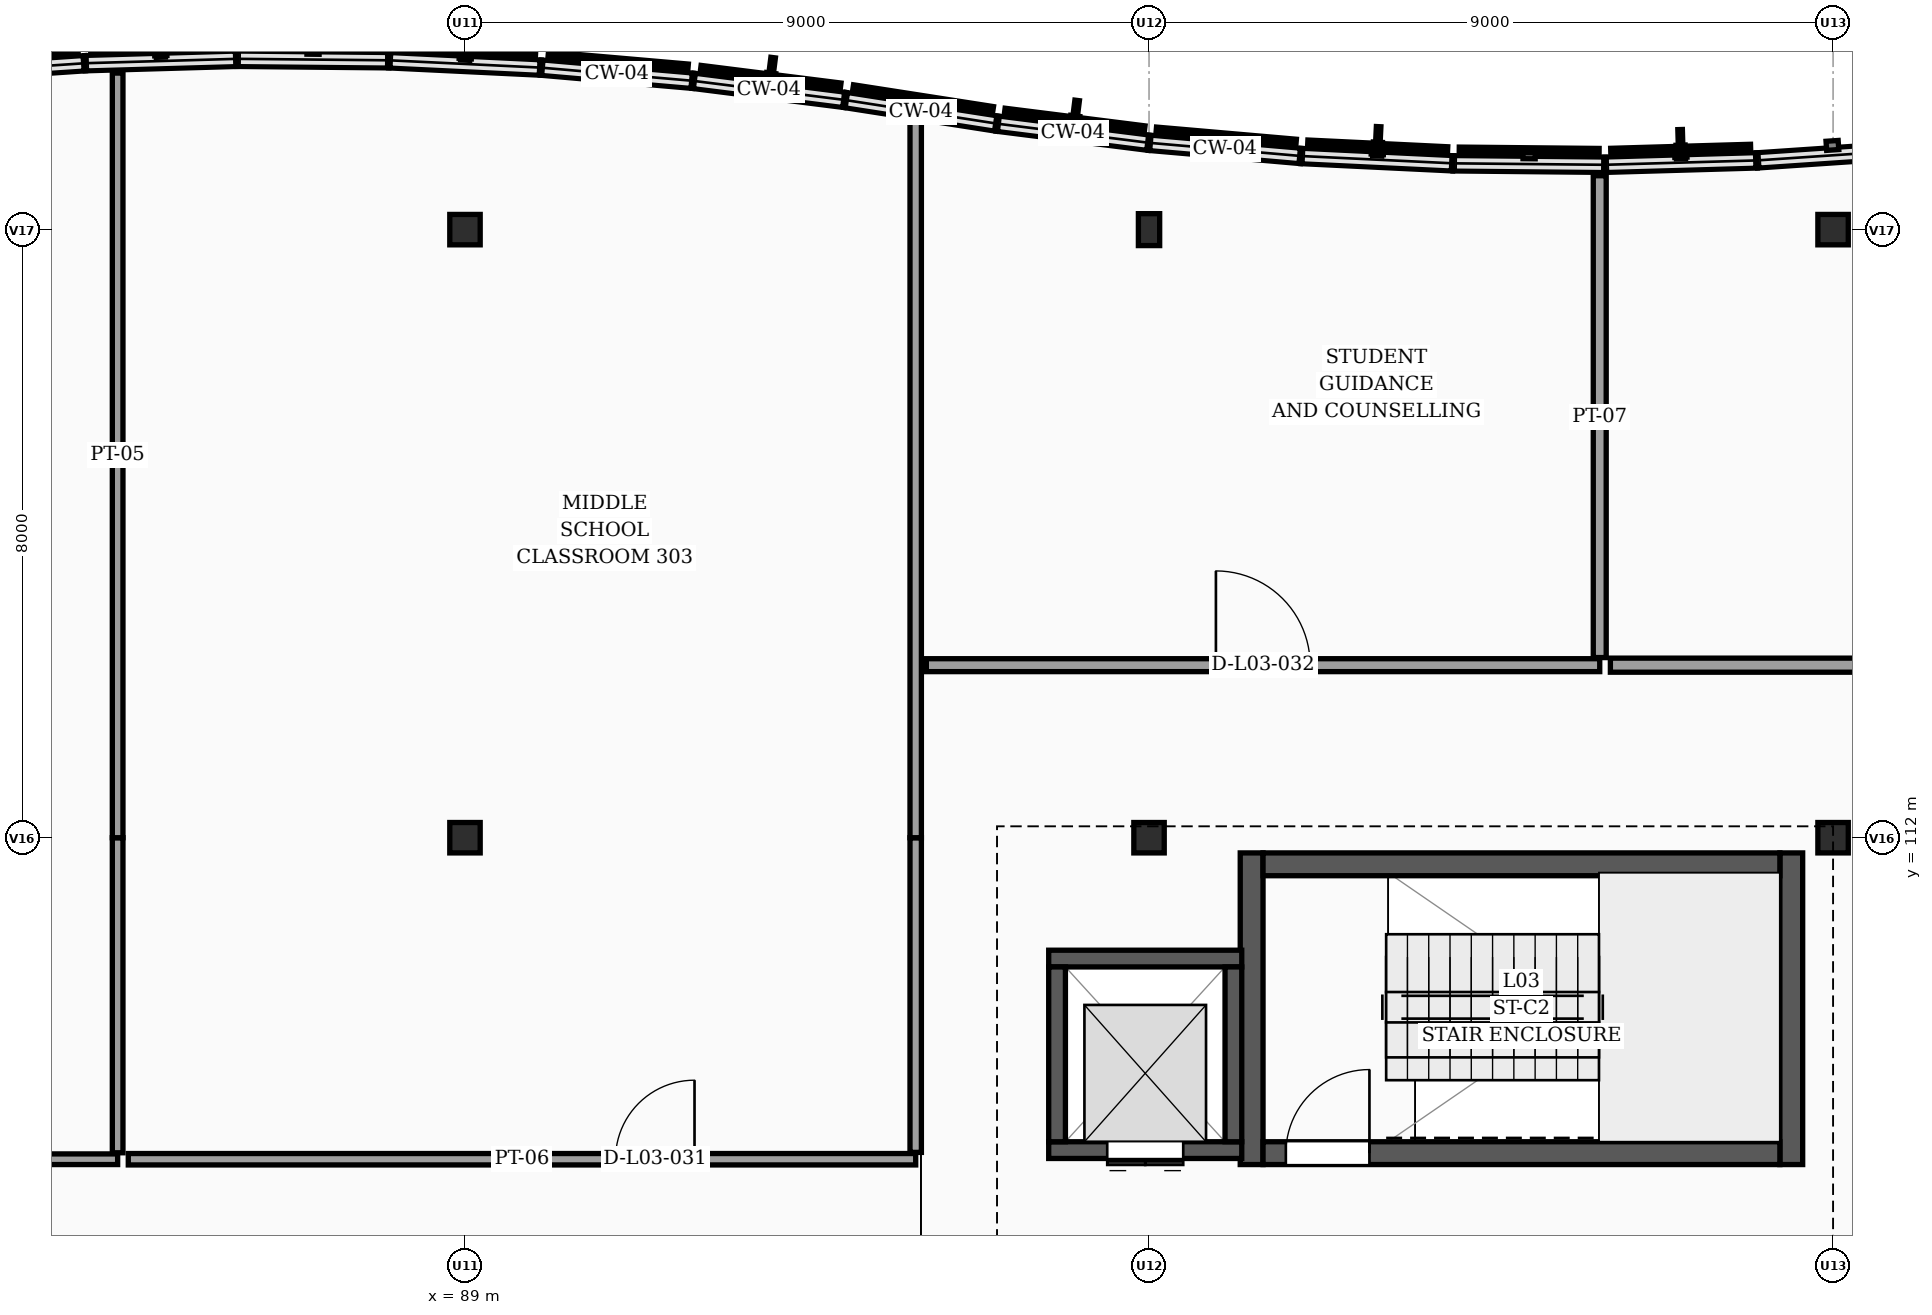
"""IFC4 building model, lengths in metres.
Left out: names, types, materials, properties, quantities, classifications, styles, units other than length and angle.
Written with IfcOpenShell. Run it as: python <this file> out.ifc"""

import sys

from ifc_helpers import new_model, si_unit, direction, frame, frame_2d, origin, origin_2d, place, context, subcontext, project, spatial, rectangle, extrude, element, fill, save


model = new_model("IFC4")
c1 = context("Model", 3, precision=1e-05, world=origin(), true_north=direction((0.0, 1.0)))
c2 = subcontext(c1, "Body", "Model", "MODEL_VIEW")
j1 = project(units=[si_unit("LENGTHUNIT", "METRE"), si_unit("PLANEANGLEUNIT", "RADIAN")], contexts=[c1])
p1 = place(None, origin())
s1 = spatial("IfcSite", under=j1, at=p1, CompositionType="ELEMENT")
p2 = place(p1, origin())
s2 = spatial("IfcBuilding", under=s1, at=p2, CompositionType="ELEMENT")
p3 = place(p2, frame((0.0, 0.0, 12.3)))
s3 = spatial("IfcBuildingStorey", under=s2, at=p3, CompositionType="ELEMENT", Elevation=12.3)
for number, where, z_axis, x_axis in (
    (1, (89.0, 112.0, 0.0), (0.0, 0.0, 1.0), (1.0, 0.0, 0.0)),
    (2, (89.0, 120.0, 0.0), (0.0, 0.0, 1.0), (1.0, 0.0, 0.0)),
    (3, (98.0, 112.0, 0.0), (0.0, 0.0, 1.0), (1.0, 0.0, 0.0)),
):
    element("IfcColumn", number, at=place(p3, frame(where, z_axis=z_axis, x_axis=x_axis)), inside=s3, PredefinedType="COLUMN", context=c2, shape_type="SweptSolid", body=[
        extrude(rectangle(XDim=0.4, YDim=0.4, at=origin_2d()), origin(), (0.0, 0.0, 1.0), 3.9),
    ])
p4 = place(p3, frame((98.0, 120.0, 0.0), z_axis=(0.0, 0.0, 1.0), x_axis=(1.0, 0.0, 0.0)))
e4 = element("IfcColumn", 4, at=p4, inside=s3, PredefinedType="PILASTER", context=c2, shape_type="SweptSolid", body=[
    extrude(rectangle(XDim=0.28, YDim=0.42, at=origin_2d()), origin(), (0.0, 0.0, 1.0), 3.9),
])
for number, where, z_axis, x_axis in (
    (5, (107.0, 112.0, 0.0), (0.0, 0.0, 1.0), (1.0, 0.0, 0.0)),
    (6, (107.0, 120.0, 0.0), (0.0, 0.0, 1.0), (1.0, 0.0, 0.0)),
):
    element("IfcColumn", number, at=place(p3, frame(where, z_axis=z_axis, x_axis=x_axis)), inside=s3, PredefinedType="COLUMN", context=c2, shape_type="SweptSolid", body=[
        extrude(rectangle(XDim=0.4, YDim=0.4, at=origin_2d()), origin(), (0.0, 0.0, 1.0), 3.9),
    ])
p5 = place(p3, frame((82.0, 122.054, 0.0), z_axis=(0.0, 0.0, 1.0), x_axis=(0.997729302978, 0.067351599676, 0.0)))
e7 = element("IfcWall", 7, at=p5, inside=s3, PredefinedType="SOLIDWALL", context=c2, shape_type="SweptSolid", body=[
    extrude(rectangle(XDim=2.005, YDim=0.2, at=frame_2d((1.002, 0.0))), origin(), (0.0, 0.0, 1.0), 0.95),
])
p6 = place(p3, frame((84.0, 122.189, 0.0), z_axis=(0.0, 0.0, 1.0), x_axis=(0.999581770858, 0.028918564416, 0.0)))
e8 = element("IfcWall", 8, at=p6, inside=s3, PredefinedType="SOLIDWALL", context=c2, shape_type="SweptSolid", body=[
    extrude(rectangle(XDim=2.001, YDim=0.2, at=frame_2d((1.0, 0.0))), origin(), (0.0, 0.0, 1.0), 0.95),
])
p7 = place(p3, frame((86.0, 122.247, 0.0), z_axis=(0.0, 0.0, 1.0), x_axis=(0.999953504169, -0.009643106302, 0.0)))
e9 = element("IfcWall", 9, at=p7, inside=s3, PredefinedType="SOLIDWALL", context=c2, shape_type="SweptSolid", body=[
    extrude(rectangle(XDim=2.0, YDim=0.2, at=frame_2d((1.0, 0.0))), origin(), (0.0, 0.0, 1.0), 0.95),
])
p8 = place(p3, frame((88.0, 122.228, 0.0), z_axis=(0.0, 0.0, 1.0), x_axis=(0.99884540439, -0.048040172037, 0.0)))
e10 = element("IfcWall", 10, at=p8, inside=s3, PredefinedType="SOLIDWALL", context=c2, shape_type="SweptSolid", body=[
    extrude(rectangle(XDim=2.002, YDim=0.2, at=frame_2d((1.001, 0.0))), origin(), (0.0, 0.0, 1.0), 0.95),
])
p9 = place(p3, frame((90.0, 122.132, 0.0), z_axis=(0.0, 0.0, 1.0), x_axis=(0.996244237948, -0.086587633962, 0.0)))
e11 = element("IfcWall", 11, at=p9, inside=s3, PredefinedType="SOLIDWALL", context=c2, shape_type="SweptSolid", body=[
    extrude(rectangle(XDim=2.008, YDim=0.2, at=frame_2d((1.004, 0.0))), origin(), (0.0, 0.0, 1.0), 0.95),
])
p10 = place(p3, frame((92.0, 121.958, 0.0), z_axis=(0.0, 0.0, 1.0), x_axis=(0.992158168336, -0.124988675503, 0.0)))
e12 = element("IfcWall", 12, at=p10, inside=s3, PredefinedType="SOLIDWALL", context=c2, shape_type="SweptSolid", body=[
    extrude(rectangle(XDim=2.016, YDim=0.2, at=frame_2d((1.008, 0.0))), origin(), (0.0, 0.0, 1.0), 0.95),
])
p11 = place(p3, frame((94.0, 121.706, 0.0), z_axis=(0.0, 0.0, 1.0), x_axis=(0.988085509852, -0.153905897287, 0.0)))
e13 = element("IfcWall", 13, at=p11, inside=s3, PredefinedType="SOLIDWALL", context=c2, shape_type="SweptSolid", body=[
    extrude(rectangle(XDim=2.024, YDim=0.2, at=frame_2d((1.012, 0.0))), origin(), (0.0, 0.0, 1.0), 0.95),
])
p12 = place(p3, frame((96.0, 121.394, 0.0), z_axis=(0.0, 0.0, 1.0), x_axis=(0.992158168336, -0.124988675503, 0.0)))
e14 = element("IfcWall", 14, at=p12, inside=s3, PredefinedType="SOLIDWALL", context=c2, shape_type="SweptSolid", body=[
    extrude(rectangle(XDim=2.016, YDim=0.2, at=frame_2d((1.008, 0.0))), origin(), (0.0, 0.0, 1.0), 0.95),
])
p13 = place(p3, frame((98.0, 121.142, 0.0), z_axis=(0.0, 0.0, 1.0), x_axis=(0.996244237948, -0.086587633962, 0.0)))
e15 = element("IfcWall", 15, at=p13, inside=s3, PredefinedType="SOLIDWALL", context=c2, shape_type="SweptSolid", body=[
    extrude(rectangle(XDim=2.008, YDim=0.2, at=frame_2d((1.004, 0.0))), origin(), (0.0, 0.0, 1.0), 0.95),
])
p14 = place(p3, frame((100.0, 120.969, 0.0), z_axis=(0.0, 0.0, 1.0), x_axis=(0.99884540439, -0.048040172037, 0.0)))
e16 = element("IfcWall", 16, at=p14, inside=s3, PredefinedType="SOLIDWALL", context=c2, shape_type="SweptSolid", body=[
    extrude(rectangle(XDim=2.002, YDim=0.2, at=frame_2d((1.001, 0.0))), origin(), (0.0, 0.0, 1.0), 0.95),
])
p15 = place(p3, frame((102.0, 120.872, 0.0), z_axis=(0.0, 0.0, 1.0), x_axis=(0.999953504169, -0.009643106302, 0.0)))
e17 = element("IfcWall", 17, at=p15, inside=s3, PredefinedType="SOLIDWALL", context=c2, shape_type="SweptSolid", body=[
    extrude(rectangle(XDim=2.0, YDim=0.2, at=frame_2d((1.0, 0.0))), origin(), (0.0, 0.0, 1.0), 0.95),
])
p16 = place(p3, frame((104.0, 120.853, 0.0), z_axis=(0.0, 0.0, 1.0), x_axis=(0.999585290582, 0.028796646555, 0.0)))
e18 = element("IfcWall", 18, at=p16, inside=s3, PredefinedType="SOLIDWALL", context=c2, shape_type="SweptSolid", body=[
    extrude(rectangle(XDim=2.001, YDim=0.2, at=frame_2d((1.0, 0.0))), origin(), (0.0, 0.0, 1.0), 0.95),
])
p17 = place(p3, frame((106.0, 120.911, 0.0), z_axis=(0.0, 0.0, 1.0), x_axis=(0.997729302978, 0.067351599676, 0.0)))
e19 = element("IfcWall", 19, at=p17, inside=s3, PredefinedType="SOLIDWALL", context=c2, shape_type="SweptSolid", body=[
    extrude(rectangle(XDim=2.005, YDim=0.2, at=frame_2d((1.002, 0.0))), origin(), (0.0, 0.0, 1.0), 0.95),
])
for number, where, z_axis, x_axis in (
    (20, (99.35, 107.7, 0.0), (0.0, 0.0, 1.0), (0.0, 1.0, 0.0)),
    (21, (106.45, 111.8, 0.0), (0.0, 0.0, 1.0), (0.0, -1.0, 0.0)),
):
    element("IfcWall", number, at=place(p3, frame(where, z_axis=z_axis, x_axis=x_axis)), inside=s3, PredefinedType="SHEAR", context=c2, shape_type="SweptSolid", body=[
        extrude(rectangle(XDim=4.1, YDim=0.3, at=frame_2d((2.05, 0.0))), origin(), (0.0, 0.0, 1.0), 3.65),
    ])
p18 = place(p3, frame((99.5, 107.85, 0.0), z_axis=(0.0, 0.0, 1.0), x_axis=(1.0, 0.0, 0.0)))
e22 = element("IfcWall", 22, at=p18, inside=s3, PredefinedType="SHEAR", context=c2, shape_type="SweptSolid", body=[
    extrude(rectangle(XDim=6.8, YDim=0.3, at=frame_2d((3.4, 0.0))), origin(), (0.0, 0.0, 1.0), 3.65),
])
p19 = place(p18, frame((0.3, 0.0, 0.0)))
e23 = element("IfcOpeningElement", 23, at=p19, cuts=e22, PredefinedType="OPENING", context=c2, shape_type="SweptSolid", body=[
    extrude(rectangle(XDim=1.1, YDim=2.15, at=frame_2d((0.55, 1.075))), frame((0.0, 0.16, 0.0), z_axis=(0.0, -1.0, 0.0), x_axis=(1.0, 0.0, 0.0)), (0.0, 0.0, 1.0), 0.32),
])
p20 = place(p3, frame((106.3, 111.65, 0.0), z_axis=(0.0, 0.0, 1.0), x_axis=(-1.0, 0.0, 0.0)))
e24 = element("IfcWall", 24, at=p20, inside=s3, PredefinedType="SHEAR", context=c2, shape_type="SweptSolid", body=[
    extrude(rectangle(XDim=6.8, YDim=0.3, at=frame_2d((3.4, 0.0))), origin(), (0.0, 0.0, 1.0), 3.65),
])
p21 = place(p3, frame((99.22, 107.89, 0.0), z_axis=(0.0, 0.0, 1.0), x_axis=(-1.0, 0.0, 0.0)))
e25 = element("IfcWall", 25, at=p21, inside=s3, PredefinedType="SHEAR", context=c2, shape_type="SweptSolid", body=[
    extrude(rectangle(XDim=2.54, YDim=0.22, at=frame_2d((1.27, 0.0))), origin(), (0.0, 0.0, 1.0), 3.65),
])
p22 = place(p21, frame((0.77, 0.0, 0.0)))
e26 = element("IfcOpeningElement", 26, at=p22, cuts=e25, PredefinedType="OPENING", context=c2, shape_type="SweptSolid", body=[
    extrude(rectangle(XDim=1.0, YDim=2.15, at=frame_2d((0.5, 1.075))), frame((0.0, 0.12, 0.0), z_axis=(0.0, -1.0, 0.0), x_axis=(1.0, 0.0, 0.0)), (0.0, 0.0, 1.0), 0.24),
])
p23 = place(p3, frame((96.68, 110.41, 0.0), z_axis=(0.0, 0.0, 1.0), x_axis=(1.0, 0.0, 0.0)))
e27 = element("IfcWall", 27, at=p23, inside=s3, PredefinedType="SHEAR", context=c2, shape_type="SweptSolid", body=[
    extrude(rectangle(XDim=2.54, YDim=0.22, at=frame_2d((1.27, 0.0))), origin(), (0.0, 0.0, 1.0), 3.65),
])
for number, where, z_axis, x_axis in (
    (28, (96.79, 108.0, 0.0), (0.0, 0.0, 1.0), (0.0, 1.0, 0.0)),
    (29, (99.11, 110.3, 0.0), (0.0, 0.0, 1.0), (0.0, -1.0, 0.0)),
):
    element("IfcWall", number, at=place(p3, frame(where, z_axis=z_axis, x_axis=x_axis)), inside=s3, PredefinedType="SHEAR", context=c2, shape_type="SweptSolid", body=[
        extrude(rectangle(XDim=2.3, YDim=0.22, at=frame_2d((1.15, 0.0))), origin(), (0.0, 0.0, 1.0), 3.65),
    ])
p24 = place(p3, frame((76.57, 107.77, 0.0), z_axis=(0.0, 0.0, 1.0), x_axis=(1.0, 0.0, 0.0)))
e30 = element("IfcWall", 30, at=p24, inside=s3, PredefinedType="PARTITIONING", context=c2, shape_type="SweptSolid", body=[
    extrude(rectangle(XDim=7.86, YDim=0.14, at=frame_2d((3.93, 0.0))), origin(), (0.0, 0.0, 1.0), 3.65),
])
p25 = place(p24, frame((4.47, 0.0, 0.0)))
e31 = element("IfcOpeningElement", 31, at=p25, cuts=e30, PredefinedType="OPENING", context=c2, shape_type="SweptSolid", body=[
    extrude(rectangle(XDim=0.92, YDim=2.2, at=frame_2d((0.46, 1.1))), frame((0.0, 0.08, 0.0), z_axis=(0.0, -1.0, 0.0), x_axis=(1.0, 0.0, 0.0)), (0.0, 0.0, 1.0), 0.16),
])
p26 = place(p3, frame((84.43, 107.855, 0.0), z_axis=(0.0, 0.0, 1.0), x_axis=(0.0, 1.0, 0.0)))
e32 = element("IfcWall", 32, at=p26, inside=s3, PredefinedType="PARTITIONING", context=c2, shape_type="SweptSolid", body=[
    extrude(rectangle(XDim=4.145, YDim=0.14, at=frame_2d((2.073, 0.0))), origin(), (0.0, 0.0, 1.0), 3.65),
])
p27 = place(p3, frame((84.43, 112.0, 0.0), z_axis=(0.0, 0.0, 1.0), x_axis=(0.0, 1.0, 0.0)))
e33 = element("IfcWall", 33, at=p27, inside=s3, PredefinedType="PARTITIONING", context=c2, shape_type="SweptSolid", body=[
    extrude(rectangle(XDim=10.06, YDim=0.14, at=frame_2d((5.03, 0.0))), origin(), (0.0, 0.0, 1.0), 3.65),
])
p28 = place(p3, frame((84.57, 107.77, 0.0), z_axis=(0.0, 0.0, 1.0), x_axis=(1.0, 0.0, 0.0)))
e34 = element("IfcWall", 34, at=p28, inside=s3, PredefinedType="PARTITIONING", context=c2, shape_type="SweptSolid", body=[
    extrude(rectangle(XDim=10.36, YDim=0.15, at=frame_2d((5.18, 0.0))), origin(), (0.0, 0.0, 1.0), 3.65),
])
p29 = place(p28, frame((6.41, 0.0, 0.0)))
e35 = element("IfcOpeningElement", 35, at=p29, cuts=e34, PredefinedType="OPENING", context=c2, shape_type="SweptSolid", body=[
    extrude(rectangle(XDim=1.04, YDim=2.25, at=frame_2d((0.52, 1.125))), frame((0.0, 0.085, 0.0), z_axis=(0.0, -1.0, 0.0), x_axis=(1.0, 0.0, 0.0)), (0.0, 0.0, 1.0), 0.17),
])
p30 = place(p3, frame((94.93, 107.86, 0.0), z_axis=(0.0, 0.0, 1.0), x_axis=(0.0, 1.0, 0.0)))
e36 = element("IfcWall", 36, at=p30, inside=s3, PredefinedType="PARTITIONING", context=c2, shape_type="SweptSolid", body=[
    extrude(rectangle(XDim=4.14, YDim=0.15, at=frame_2d((2.07, 0.0))), origin(), (0.0, 0.0, 1.0), 3.248),
])
p31 = place(p3, frame((94.93, 112.0, 0.0), z_axis=(0.0, 0.0, 1.0), x_axis=(0.0, 1.0, 0.0)))
e37 = element("IfcWall", 37, at=p31, inside=s3, PredefinedType="PARTITIONING", context=c2, shape_type="SweptSolid", body=[
    extrude(rectangle(XDim=9.419, YDim=0.15, at=frame_2d((4.709, 0.0))), origin(), (0.0, 0.0, 1.0), 3.25),
])
p32 = place(p3, frame((95.07, 114.27, 0.0), z_axis=(0.0, 0.0, 1.0), x_axis=(1.0, 0.0, 0.0)))
e38 = element("IfcWall", 38, at=p32, inside=s3, PredefinedType="PARTITIONING", context=c2, shape_type="SweptSolid", body=[
    extrude(rectangle(XDim=8.86, YDim=0.17, at=frame_2d((4.43, 0.0))), origin(), (0.0, 0.0, 1.0), 3.65),
])
p33 = place(p32, frame((3.81, 0.0, 0.0)))
e39 = element("IfcOpeningElement", 39, at=p33, cuts=e38, PredefinedType="OPENING", context=c2, shape_type="SweptSolid", body=[
    extrude(rectangle(XDim=1.24, YDim=2.25, at=frame_2d((0.62, 1.125))), frame((0.0, 0.095, 0.0), z_axis=(0.0, -1.0, 0.0), x_axis=(1.0, 0.0, 0.0)), (0.0, 0.0, 1.0), 0.19),
])
p34 = place(p3, frame((103.93, 114.37, 0.0), z_axis=(0.0, 0.0, 1.0), x_axis=(0.0, 1.0, 0.0)))
e40 = element("IfcWall", 40, at=p34, inside=s3, PredefinedType="PARTITIONING", context=c2, shape_type="SweptSolid", body=[
    extrude(rectangle(XDim=6.339, YDim=0.17, at=frame_2d((3.169, 0.0))), origin(), (0.0, 0.0, 1.0), 3.65),
])
p35 = place(p3, frame((104.07, 114.27, 0.0), z_axis=(0.0, 0.0, 1.0), x_axis=(1.0, 0.0, 0.0)))
e41 = element("IfcWall", 41, at=p35, inside=s3, PredefinedType="PARTITIONING", context=c2, shape_type="SweptSolid", body=[
    extrude(rectangle(XDim=11.66, YDim=0.185, at=frame_2d((5.83, 0.0))), origin(), (0.0, 0.0, 1.0), 3.65),
])
p36 = place(p35, frame((5.69, 0.0, 0.0)))
e42 = element("IfcOpeningElement", 42, at=p36, cuts=e41, PredefinedType="OPENING", context=c2, shape_type="SweptSolid", body=[
    extrude(rectangle(XDim=1.48, YDim=2.25, at=frame_2d((0.74, 1.125))), frame((0.0, 0.103, 0.0), z_axis=(0.0, -1.0, 0.0), x_axis=(1.0, 0.0, 0.0)), (0.0, 0.0, 1.0), 0.205),
])
p37 = place(p19, origin())
e43 = element("IfcDoor", 43, at=p37, inside=s3, OperationType="SINGLE_SWING_RIGHT", PredefinedType="DOOR", context=c2, shape_type="SweptSolid", body=[
    extrude(rectangle(XDim=1.1, YDim=2.15, at=frame_2d((0.55, 1.075))), frame((0.0, 0.025, 0.0), z_axis=(0.0, -1.0, 0.0), x_axis=(1.0, 0.0, 0.0)), (0.0, 0.0, 1.0), 0.05),
])
fill(e23, e43)
p38 = place(p22, origin())
e44 = element("IfcDoor", 44, at=p38, inside=s3, OperationType="DOUBLE_DOOR_SLIDING", PredefinedType="DOOR", context=c2, shape_type="SweptSolid", body=[
    extrude(rectangle(XDim=1.0, YDim=2.15, at=frame_2d((0.5, 1.075))), frame((0.0, 0.025, 0.0), z_axis=(0.0, -1.0, 0.0), x_axis=(1.0, 0.0, 0.0)), (0.0, 0.0, 1.0), 0.05),
])
fill(e26, e44)
p39 = place(p29, origin())
e45 = element("IfcDoor", 45, at=p39, inside=s3, OperationType="SINGLE_SWING_RIGHT", PredefinedType="DOOR", context=c2, shape_type="SweptSolid", body=[
    extrude(rectangle(XDim=1.04, YDim=2.25, at=frame_2d((0.52, 1.125))), frame((0.0, 0.025, 0.0), z_axis=(0.0, -1.0, 0.0), x_axis=(1.0, 0.0, 0.0)), (0.0, 0.0, 1.0), 0.05),
])
fill(e35, e45)
p40 = place(p33, origin())
e46 = element("IfcDoor", 46, at=p40, inside=s3, OperationType="SINGLE_SWING_LEFT", PredefinedType="DOOR", context=c2, shape_type="SweptSolid", body=[
    extrude(rectangle(XDim=1.24, YDim=2.25, at=frame_2d((0.62, 1.125))), frame((0.0, 0.025, 0.0), z_axis=(0.0, -1.0, 0.0), x_axis=(1.0, 0.0, 0.0)), (0.0, 0.0, 1.0), 0.05),
])
fill(e39, e46)
save(model, sys.argv[1])
